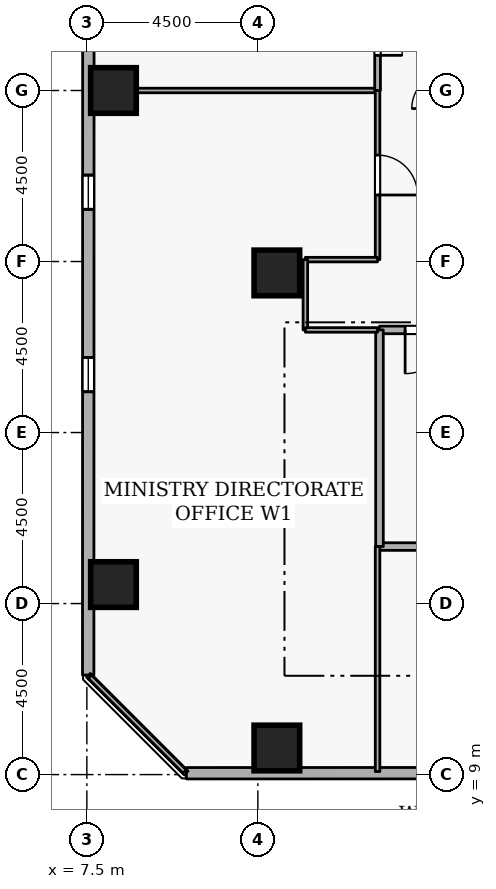
"""IFC4 building model, lengths in metres.
Left out: names, types, materials, properties, quantities, classifications, styles, units other than length and angle.
Written with IfcOpenShell. Run it as: python <this file> out.ifc"""

import sys

from ifc_helpers import new_model, si_unit, direction, frame, frame_2d, origin, origin_2d, place, context, subcontext, project, spatial, rectangle, extrude, element, fill, save


model = new_model("IFC4")
c1 = context("Model", 3, precision=1e-05, world=origin(), true_north=direction((0.0, 1.0)))
c2 = subcontext(c1, "Body", "Model", "MODEL_VIEW")
j1 = project(units=[si_unit("LENGTHUNIT", "METRE"), si_unit("PLANEANGLEUNIT", "RADIAN")], contexts=[c1])
p1 = place(None, origin())
s1 = spatial("IfcSite", under=j1, at=p1, CompositionType="ELEMENT")
p2 = place(p1, origin())
s2 = spatial("IfcBuilding", under=s1, at=p2, CompositionType="ELEMENT")
p3 = place(p2, frame((0.0, 0.0, 87.3)))
s3 = spatial("IfcBuildingStorey", under=s2, at=p3, CompositionType="ELEMENT", Elevation=87.3)
for number, where, z_axis, x_axis in (
    (1, (12.5, 9.7, 0.0), (0.0, 0.0, 1.0), (1.0, 0.0, 0.0)),
    (2, (8.2, 14.0, 0.0), (0.0, 0.0, 1.0), (1.0, 0.0, 0.0)),
    (3, (8.2, 27.0, 0.0), (0.0, 0.0, 1.0), (1.0, 0.0, 0.0)),
    (4, (12.5, 22.2, 0.0), (0.0, 0.0, 1.0), (1.0, 0.0, 0.0)),
):
    element("IfcColumn", number, at=place(p3, frame(where, z_axis=z_axis, x_axis=x_axis)), inside=s3, PredefinedType="COLUMN", context=c2, shape_type="SweptSolid", body=[
        extrude(rectangle(XDim=1.2, YDim=1.2, at=origin_2d()), origin(), (0.0, 0.0, 1.0), 3.6),
    ])
p4 = place(p3, frame((10.119, 9.035, 0.0), z_axis=(0.0, 0.0, 1.0), x_axis=(0.999999970468, 0.000243032466, 0.0)))
e5 = element("IfcWall", 5, at=p4, inside=s3, PredefinedType="STANDARD", context=c2, shape_type="SweptSolid", body=[
    extrude(rectangle(XDim=34.155, YDim=0.3, at=frame_2d((17.078, 0.0))), origin(), (0.0, 0.0, 1.0), 2.7),
])
p5 = place(p4, frame((6.6, 0.0, 0.72)))
e6 = element("IfcOpeningElement", 6, at=p5, cuts=e5, PredefinedType="OPENING", context=c2, shape_type="SweptSolid", body=[
    extrude(rectangle(XDim=0.9, YDim=1.75, at=frame_2d((0.45, 0.875))), frame((0.0, 0.16, 0.0), z_axis=(0.0, -1.0, 0.0), x_axis=(1.0, 0.0, 0.0)), (0.0, 0.0, 1.0), 0.32),
])
p6 = place(p4, frame((11.4, 0.0, 0.72)))
e7 = element("IfcOpeningElement", 7, at=p6, cuts=e5, PredefinedType="OPENING", context=c2, shape_type="SweptSolid", body=[
    extrude(rectangle(XDim=0.9, YDim=1.75, at=frame_2d((0.45, 0.875))), frame((0.0, 0.16, 0.0), z_axis=(0.0, -1.0, 0.0), x_axis=(1.0, 0.0, 0.0)), (0.0, 0.0, 1.0), 0.32),
])
p7 = place(p4, frame((21.0, 0.0, 0.72)))
e8 = element("IfcOpeningElement", 8, at=p7, cuts=e5, PredefinedType="OPENING", context=c2, shape_type="SweptSolid", body=[
    extrude(rectangle(XDim=0.9, YDim=1.75, at=frame_2d((0.45, 0.875))), frame((0.0, 0.16, 0.0), z_axis=(0.0, -1.0, 0.0), x_axis=(1.0, 0.0, 0.0)), (0.0, 0.0, 1.0), 0.32),
])
p8 = place(p4, frame((25.8, 0.0, 0.72)))
e9 = element("IfcOpeningElement", 9, at=p8, cuts=e5, PredefinedType="OPENING", context=c2, shape_type="SweptSolid", body=[
    extrude(rectangle(XDim=0.9, YDim=1.75, at=frame_2d((0.45, 0.875))), frame((0.0, 0.16, 0.0), z_axis=(0.0, -1.0, 0.0), x_axis=(1.0, 0.0, 0.0)), (0.0, 0.0, 1.0), 0.32),
])
p9 = place(p4, frame((30.6, 0.0, 0.72)))
e10 = element("IfcOpeningElement", 10, at=p9, cuts=e5, PredefinedType="OPENING", context=c2, shape_type="SweptSolid", body=[
    extrude(rectangle(XDim=0.9, YDim=1.75, at=frame_2d((0.45, 0.875))), frame((0.0, 0.16, 0.0), z_axis=(0.0, -1.0, 0.0), x_axis=(1.0, 0.0, 0.0)), (0.0, 0.0, 1.0), 0.32),
])
p10 = place(p3, frame((7.544, 45.774, 0.0), z_axis=(0.0, 0.0, 1.0), x_axis=(-0.000243032466, -0.999999970468, 0.0)))
e11 = element("IfcWall", 11, at=p10, inside=s3, PredefinedType="STANDARD", context=c2, shape_type="SweptSolid", body=[
    extrude(rectangle(XDim=34.155, YDim=0.3, at=frame_2d((17.078, 0.0))), origin(), (0.0, 0.0, 1.0), 2.7),
])
p11 = place(p10, frame((1.8, 0.0, 0.72)))
e12 = element("IfcOpeningElement", 12, at=p11, cuts=e11, PredefinedType="OPENING", context=c2, shape_type="SweptSolid", body=[
    extrude(rectangle(XDim=0.9, YDim=1.75, at=frame_2d((0.45, 0.875))), frame((0.0, 0.16, 0.0), z_axis=(0.0, -1.0, 0.0), x_axis=(1.0, 0.0, 0.0)), (0.0, 0.0, 1.0), 0.32),
])
p12 = place(p10, frame((11.4, 0.0, 0.72)))
e13 = element("IfcOpeningElement", 13, at=p12, cuts=e11, PredefinedType="OPENING", context=c2, shape_type="SweptSolid", body=[
    extrude(rectangle(XDim=0.9, YDim=1.75, at=frame_2d((0.45, 0.875))), frame((0.0, 0.16, 0.0), z_axis=(0.0, -1.0, 0.0), x_axis=(1.0, 0.0, 0.0)), (0.0, 0.0, 1.0), 0.32),
])
p13 = place(p10, frame((16.2, 0.0, 0.72)))
e14 = element("IfcOpeningElement", 14, at=p13, cuts=e11, PredefinedType="OPENING", context=c2, shape_type="SweptSolid", body=[
    extrude(rectangle(XDim=0.9, YDim=1.75, at=frame_2d((0.45, 0.875))), frame((0.0, 0.16, 0.0), z_axis=(0.0, -1.0, 0.0), x_axis=(1.0, 0.0, 0.0)), (0.0, 0.0, 1.0), 0.32),
])
p14 = place(p10, frame((21.0, 0.0, 0.72)))
e15 = element("IfcOpeningElement", 15, at=p14, cuts=e11, PredefinedType="OPENING", context=c2, shape_type="SweptSolid", body=[
    extrude(rectangle(XDim=0.9, YDim=1.75, at=frame_2d((0.45, 0.875))), frame((0.0, 0.16, 0.0), z_axis=(0.0, -1.0, 0.0), x_axis=(1.0, 0.0, 0.0)), (0.0, 0.0, 1.0), 0.32),
])
p15 = place(p10, frame((25.8, 0.0, 0.72)))
e16 = element("IfcOpeningElement", 16, at=p15, cuts=e11, PredefinedType="OPENING", context=c2, shape_type="SweptSolid", body=[
    extrude(rectangle(XDim=0.9, YDim=1.75, at=frame_2d((0.45, 0.875))), frame((0.0, 0.16, 0.0), z_axis=(0.0, -1.0, 0.0), x_axis=(1.0, 0.0, 0.0)), (0.0, 0.0, 1.0), 0.32),
])
p16 = place(p3, frame((15.2, 15.0, 0.0), z_axis=(0.0, 0.0, 1.0), x_axis=(1.0, 0.0, 0.0)))
e17 = element("IfcWall", 17, at=p16, inside=s3, PredefinedType="STANDARD", context=c2, shape_type="SweptSolid", body=[
    extrude(rectangle(XDim=2.5, YDim=0.2, at=frame_2d((1.25, 0.0))), origin(), (0.0, 0.0, 1.0), 3.34),
])
p17 = place(p3, frame((17.7, 20.7, 0.0), z_axis=(0.0, 0.0, 1.0), x_axis=(-1.0, 0.0, 0.0)))
e18 = element("IfcWall", 18, at=p17, inside=s3, PredefinedType="STANDARD", context=c2, shape_type="SweptSolid", body=[
    extrude(rectangle(XDim=2.5, YDim=0.2, at=frame_2d((1.25, 0.0))), origin(), (0.0, 0.0, 1.0), 3.34),
])
p18 = place(p17, frame((0.675, 0.0, 0.0)))
e19 = element("IfcOpeningElement", 19, at=p18, cuts=e18, PredefinedType="OPENING", context=c2, shape_type="SweptSolid", body=[
    extrude(rectangle(XDim=1.15, YDim=2.1, at=frame_2d((0.575, 1.05))), frame((0.0, 0.11, 0.0), z_axis=(0.0, -1.0, 0.0), x_axis=(1.0, 0.0, 0.0)), (0.0, 0.0, 1.0), 0.22),
])
p19 = place(p3, frame((15.2, 20.7, 0.0), z_axis=(0.0, 0.0, 1.0), x_axis=(0.0, -1.0, 0.0)))
e20 = element("IfcWall", 20, at=p19, inside=s3, PredefinedType="STANDARD", context=c2, shape_type="SweptSolid", body=[
    extrude(rectangle(XDim=5.7, YDim=0.2, at=frame_2d((2.85, 0.0))), origin(), (0.0, 0.0, 1.0), 3.34),
])
p20 = place(p3, frame((7.58, 27.0, 0.0), z_axis=(0.0, 0.0, 1.0), x_axis=(1.0, 0.0, 0.0)))
e21 = element("IfcWall", 21, at=p20, inside=s3, PredefinedType="PARTITIONING", context=c2, shape_type="SweptSolid", body=[
    extrude(rectangle(XDim=7.57, YDim=0.12, at=frame_2d((3.785, 0.0))), origin(), (0.0, 0.0, 1.0), 2.932),
])
p21 = place(p3, frame((15.15, 27.0, 0.0), z_axis=(0.0, 0.0, 1.0), x_axis=(0.0, -1.0, 0.0)))
e22 = element("IfcWall", 22, at=p21, inside=s3, PredefinedType="PARTITIONING", context=c2, shape_type="SweptSolid", body=[
    extrude(rectangle(XDim=4.45, YDim=0.12, at=frame_2d((2.225, 0.0))), origin(), (0.0, 0.0, 1.0), 3.34),
])
p22 = place(p21, frame((1.7, 0.0, 0.0)))
e23 = element("IfcOpeningElement", 23, at=p22, cuts=e22, PredefinedType="OPENING", context=c2, shape_type="SweptSolid", body=[
    extrude(rectangle(XDim=1.05, YDim=2.1, at=frame_2d((0.525, 1.05))), frame((0.0, 0.07, 0.0), z_axis=(0.0, -1.0, 0.0), x_axis=(1.0, 0.0, 0.0)), (0.0, 0.0, 1.0), 0.14),
])
p23 = place(p3, frame((15.15, 22.55, 0.0), z_axis=(0.0, 0.0, 1.0), x_axis=(-1.0, 0.0, 0.0)))
e24 = element("IfcWall", 24, at=p23, inside=s3, PredefinedType="PARTITIONING", context=c2, shape_type="SweptSolid", body=[
    extrude(rectangle(XDim=1.9, YDim=0.12, at=frame_2d((0.95, 0.0))), origin(), (0.0, 0.0, 1.0), 3.34),
])
p24 = place(p3, frame((13.25, 22.55, 0.0), z_axis=(0.0, 0.0, 1.0), x_axis=(0.0, -1.0, 0.0)))
e25 = element("IfcWall", 25, at=p24, inside=s3, PredefinedType="PARTITIONING", context=c2, shape_type="SweptSolid", body=[
    extrude(rectangle(XDim=1.85, YDim=0.12, at=frame_2d((0.925, 0.0))), origin(), (0.0, 0.0, 1.0), 3.34),
])
p25 = place(p3, frame((13.25, 20.7, 0.0), z_axis=(0.0, 0.0, 1.0), x_axis=(1.0, 0.0, 0.0)))
e26 = element("IfcWall", 26, at=p25, inside=s3, PredefinedType="PARTITIONING", context=c2, shape_type="SweptSolid", body=[
    extrude(rectangle(XDim=1.9, YDim=0.12, at=frame_2d((0.95, 0.0))), origin(), (0.0, 0.0, 1.0), 3.34),
])
p26 = place(p3, frame((15.15, 15.0, 0.0), z_axis=(0.0, 0.0, 1.0), x_axis=(0.0, -1.0, 0.0)))
e27 = element("IfcWall", 27, at=p26, inside=s3, PredefinedType="PARTITIONING", context=c2, shape_type="SweptSolid", body=[
    extrude(rectangle(XDim=5.92, YDim=0.12, at=frame_2d((2.96, 0.0))), origin(), (0.0, 0.0, 1.0), 3.34),
])
p27 = place(p3, frame((10.075, 9.08, 0.0), z_axis=(0.0, 0.0, 1.0), x_axis=(-0.707106781187, 0.707106781187, 0.0)))
e28 = element("IfcWall", 28, at=p27, inside=s3, PredefinedType="PARTITIONING", context=c2, shape_type="SweptSolid", body=[
    extrude(rectangle(XDim=3.528, YDim=0.12, at=frame_2d((1.764, 0.0))), origin(), (0.0, 0.0, 1.0), 3.34),
])
p28 = place(p3, frame((15.15, 30.15, 0.0), z_axis=(0.0, 0.0, 1.0), x_axis=(0.0, -1.0, 0.0)))
e29 = element("IfcWall", 29, at=p28, inside=s3, PredefinedType="PARTITIONING", context=c2, shape_type="SweptSolid", body=[
    extrude(rectangle(XDim=3.15, YDim=0.15, at=frame_2d((1.575, 0.0))), origin(), (0.0, 0.0, 1.0), 3.34),
])
p29 = place(p28, frame((0.925, 0.0, 0.0)))
e30 = element("IfcOpeningElement", 30, at=p29, cuts=e29, PredefinedType="OPENING", context=c2, shape_type="SweptSolid", body=[
    extrude(rectangle(XDim=1.3, YDim=2.12, at=frame_2d((0.65, 1.06))), frame((0.0, 0.085, 0.0), z_axis=(0.0, -1.0, 0.0), x_axis=(1.0, 0.0, 0.0)), (0.0, 0.0, 1.0), 0.17),
])
p30 = place(p14, origin())
e31 = element("IfcWindow", 31, at=p30, inside=s3, PartitioningType="SINGLE_PANEL", PredefinedType="WINDOW", context=c2, shape_type="SweptSolid", body=[
    extrude(rectangle(XDim=0.9, YDim=1.75, at=frame_2d((0.45, 0.875))), frame((0.0, 0.03, 0.0), z_axis=(0.0, -1.0, 0.0), x_axis=(1.0, 0.0, 0.0)), (0.0, 0.0, 1.0), 0.06),
])
fill(e15, e31)
p31 = place(p15, origin())
e32 = element("IfcWindow", 32, at=p31, inside=s3, PartitioningType="SINGLE_PANEL", PredefinedType="WINDOW", context=c2, shape_type="SweptSolid", body=[
    extrude(rectangle(XDim=0.9, YDim=1.75, at=frame_2d((0.45, 0.875))), frame((0.0, 0.03, 0.0), z_axis=(0.0, -1.0, 0.0), x_axis=(1.0, 0.0, 0.0)), (0.0, 0.0, 1.0), 0.06),
])
fill(e16, e32)
p32 = place(p18, origin())
e33 = element("IfcDoor", 33, at=p32, inside=s3, OperationType="SINGLE_SWING_RIGHT", PredefinedType="DOOR", context=c2, shape_type="SweptSolid", body=[
    extrude(rectangle(XDim=1.15, YDim=2.1, at=frame_2d((0.575, 1.05))), frame((0.0, 0.025, 0.0), z_axis=(0.0, -1.0, 0.0), x_axis=(1.0, 0.0, 0.0)), (0.0, 0.0, 1.0), 0.05),
])
fill(e19, e33)
p33 = place(p22, origin())
e34 = element("IfcDoor", 34, at=p33, inside=s3, OperationType="SINGLE_SWING_RIGHT", PredefinedType="DOOR", context=c2, shape_type="SweptSolid", body=[
    extrude(rectangle(XDim=1.05, YDim=2.1, at=frame_2d((0.525, 1.05))), frame((0.0, 0.025, 0.0), z_axis=(0.0, -1.0, 0.0), x_axis=(1.0, 0.0, 0.0)), (0.0, 0.0, 1.0), 0.05),
])
fill(e23, e34)
p34 = place(p29, origin())
e35 = element("IfcDoor", 35, at=p34, inside=s3, OperationType="DOUBLE_DOOR_SINGLE_SWING", PredefinedType="DOOR", context=c2, shape_type="SweptSolid", body=[
    extrude(rectangle(XDim=1.3, YDim=2.12, at=frame_2d((0.65, 1.06))), frame((0.0, 0.025, 0.0), z_axis=(0.0, -1.0, 0.0), x_axis=(1.0, 0.0, 0.0)), (0.0, 0.0, 1.0), 0.05),
])
fill(e30, e35)
save(model, sys.argv[1])
